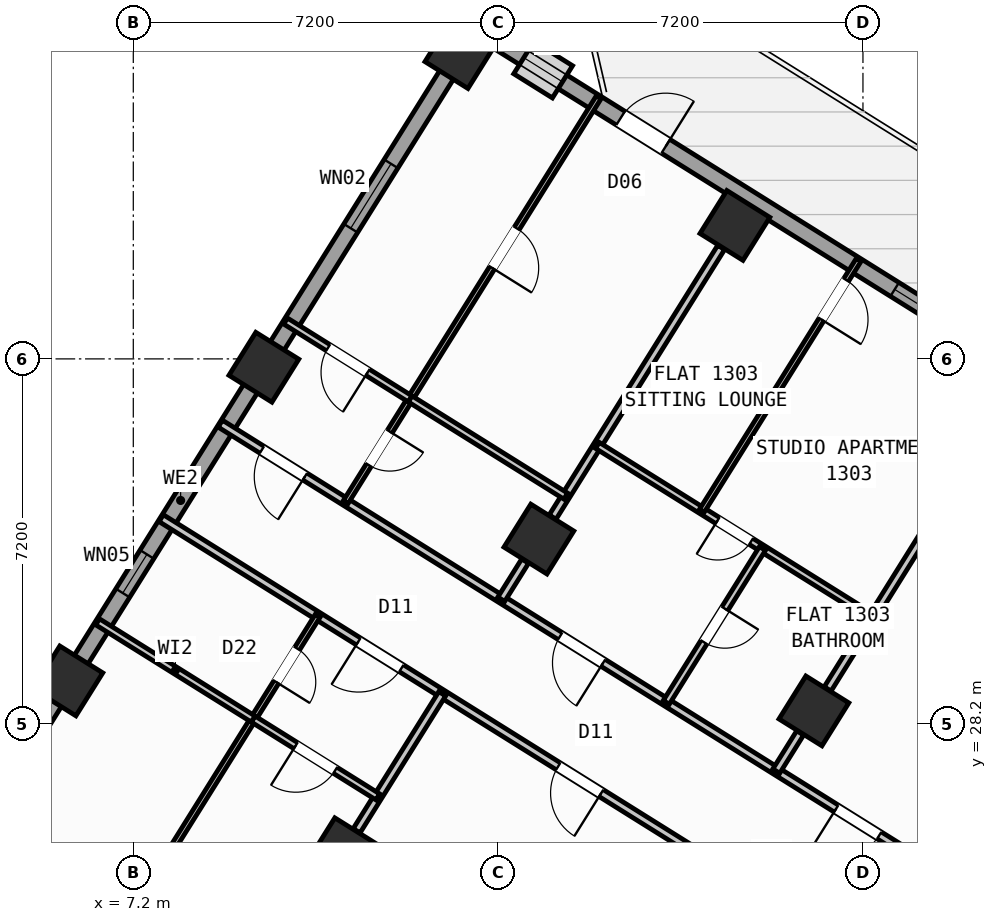
"""IFC4 building model, lengths in metres.
Left out: names, types, materials, properties, quantities, classifications, styles, units other than length and angle.
Written with IfcOpenShell. Run it as: python <this file> out.ifc"""

import sys

from ifc_helpers import new_model, si_unit, direction, frame, frame_2d, origin, origin_2d, place, context, subcontext, project, spatial, rectangle, hollow_rectangle, extrude, source, transform, mapped, element, fill, save


model = new_model("IFC4")
c1 = context("Model", 3, precision=1e-05, world=origin(), true_north=direction((0.0, 1.0)))
c2 = subcontext(c1, "Body", "Model", "MODEL_VIEW")
j1 = project(units=[si_unit("LENGTHUNIT", "METRE"), si_unit("PLANEANGLEUNIT", "RADIAN")], contexts=[c1])
p1 = place(None, origin())
s1 = spatial("IfcSite", under=j1, at=p1, CompositionType="ELEMENT")
p2 = place(p1, origin())
s2 = spatial("IfcBuilding", under=s1, at=p2, CompositionType="ELEMENT")
p3 = place(p2, frame((0.0, 0.0, 52.8)))
s3 = spatial("IfcBuildingStorey", under=s2, at=p3, CompositionType="ELEMENT", Elevation=52.8)
m1 = source(origin(), c2, "Body", "SweptSolid", [
    extrude(hollow_rectangle(XDim=1.0, YDim=1.0, WallThickness=0.04, at=origin_2d()), origin(), (0.0, 0.0, 1.0), 3.6),
])
for number, where, z_axis, x_axis in (
    (1, (20.632, 28.452, 0.0), (0.0, 0.0, 1.0), (-0.848, 0.53, 0.0)),
    (2, (19.073, 38.034, 0.0), (0.0, 0.0, 1.0), (-0.848, 0.53, 0.0)),
    (3, (15.205, 31.844, 0.0), (0.0, 0.0, 1.0), (-0.848, 0.53, 0.0)),
    (4, (11.336, 25.653, 0.0), (0.0, 0.0, 1.0), (-0.848, 0.53, 0.0)),
    (5, (13.646, 41.426, 0.0), (0.0, 0.0, 1.0), (-0.848, 0.53, 0.0)),
    (6, (9.777, 35.235, 0.0), (0.0, 0.0, 1.0), (-0.848, 0.53, 0.0)),
    (7, (5.909, 29.044, 0.0), (0.0, 0.0, 1.0), (-0.848, 0.53, 0.0)),
):
    element("IfcColumn", number, at=place(p3, frame(where, z_axis=z_axis, x_axis=x_axis)), inside=s3, PredefinedType="COLUMN", context=c2, shape_type="MappedRepresentation", body=[
        mapped(m1, transform((0.0, 0.0, 0.0), scale=1.0)),
    ])
p4 = place(p3, frame((2.415, 23.452, 0.0), z_axis=(0.0, 0.0, 1.0), x_axis=(0.52991049553, 0.848053575387, 0.0)))
e8 = element("IfcWall", 8, at=p4, inside=s3, PredefinedType="STANDARD", context=c2, shape_type="SweptSolid", body=[
    extrude(rectangle(XDim=21.587, YDim=0.32, at=frame_2d((10.794, 0.0))), origin(), (0.0, 0.0, 1.0), 2.725),
])
p5 = place(p4, frame((2.356, 0.0, 0.8)))
e9 = element("IfcOpeningElement", 9, at=p5, cuts=e8, PredefinedType="OPENING", context=c2, shape_type="SweptSolid", body=[
    extrude(rectangle(XDim=2.1, YDim=1.55, at=frame_2d((1.05, 0.775))), frame((0.0, 0.17, 0.0), z_axis=(0.0, -1.0, 0.0), x_axis=(1.0, 0.0, 0.0)), (0.0, 0.0, 1.0), 0.34),
])
p6 = place(p4, frame((8.639, 0.0, 1.0)))
e10 = element("IfcOpeningElement", 10, at=p6, cuts=e8, PredefinedType="OPENING", context=c2, shape_type="SweptSolid", body=[
    extrude(rectangle(XDim=0.9, YDim=1.25, at=frame_2d((0.45, 0.625))), frame((0.0, 0.17, 0.0), z_axis=(0.0, -1.0, 0.0), x_axis=(1.0, 0.0, 0.0)), (0.0, 0.0, 1.0), 0.34),
])
p7 = place(p4, frame((17.129, 0.0, 0.85)))
e11 = element("IfcOpeningElement", 11, at=p7, cuts=e8, PredefinedType="OPENING", context=c2, shape_type="SweptSolid", body=[
    extrude(rectangle(XDim=1.5, YDim=1.5, at=frame_2d((0.75, 0.75))), frame((0.0, 0.17, 0.0), z_axis=(0.0, -1.0, 0.0), x_axis=(1.0, 0.0, 0.0)), (0.0, 0.0, 1.0), 0.34),
])
p8 = place(p3, frame((14.138, 41.825, 0.0), z_axis=(0.0, 0.0, 1.0), x_axis=(0.848046498049, -0.529921821731, 0.0)))
e12 = element("IfcWall", 12, at=p8, inside=s3, PredefinedType="STANDARD", context=c2, shape_type="SweptSolid", body=[
    extrude(rectangle(XDim=31.588, YDim=0.32, at=frame_2d((15.794, 0.0))), origin(), (0.0, 0.0, 1.0), 3.35),
])
p9 = place(p8, frame((3.159, 0.0, 0.0)))
e13 = element("IfcOpeningElement", 13, at=p9, cuts=e12, PredefinedType="OPENING", context=c2, shape_type="SweptSolid", body=[
    extrude(rectangle(XDim=1.05, YDim=2.15, at=frame_2d((0.525, 1.075))), frame((0.0, 0.17, 0.0), z_axis=(0.0, -1.0, 0.0), x_axis=(1.0, 0.0, 0.0)), (0.0, 0.0, 1.0), 0.34),
])
p10 = place(p8, frame((0.906, 0.0, 1.0)))
e14 = element("IfcOpeningElement", 14, at=p10, cuts=e12, PredefinedType="OPENING", context=c2, shape_type="SweptSolid", body=[
    extrude(rectangle(XDim=0.9, YDim=1.25, at=frame_2d((0.45, 0.625))), frame((0.0, 0.17, 0.0), z_axis=(0.0, -1.0, 0.0), x_axis=(1.0, 0.0, 0.0)), (0.0, 0.0, 1.0), 0.34),
])
p11 = place(p8, frame((9.537, 0.0, 0.85)))
e15 = element("IfcOpeningElement", 15, at=p11, cuts=e12, PredefinedType="OPENING", context=c2, shape_type="SweptSolid", body=[
    extrude(rectangle(XDim=1.8, YDim=1.5, at=frame_2d((0.9, 0.75))), frame((0.0, 0.17, 0.0), z_axis=(0.0, -1.0, 0.0), x_axis=(1.0, 0.0, 0.0)), (0.0, 0.0, 1.0), 0.34),
])
p12 = place(p8, frame((13.899, 0.0, 0.85)))
e16 = element("IfcOpeningElement", 16, at=p12, cuts=e12, PredefinedType="OPENING", context=c2, shape_type="SweptSolid", body=[
    extrude(rectangle(XDim=1.5, YDim=1.5, at=frame_2d((0.75, 0.75))), frame((0.0, 0.17, 0.0), z_axis=(0.0, -1.0, 0.0), x_axis=(1.0, 0.0, 0.0)), (0.0, 0.0, 1.0), 0.34),
])
p13 = place(p8, frame((22.019, 0.0, 0.95)))
e17 = element("IfcOpeningElement", 17, at=p13, cuts=e12, PredefinedType="OPENING", context=c2, shape_type="SweptSolid", body=[
    extrude(rectangle(XDim=1.2, YDim=1.4, at=frame_2d((0.6, 0.7))), frame((0.0, 0.17, 0.0), z_axis=(0.0, -1.0, 0.0), x_axis=(1.0, 0.0, 0.0)), (0.0, 0.0, 1.0), 0.34),
])
p14 = place(p8, frame((27.569, 0.0, 0.95)))
e18 = element("IfcOpeningElement", 18, at=p14, cuts=e12, PredefinedType="OPENING", context=c2, shape_type="SweptSolid", body=[
    extrude(rectangle(XDim=1.2, YDim=1.4, at=frame_2d((0.6, 0.7))), frame((0.0, 0.17, 0.0), z_axis=(0.0, -1.0, 0.0), x_axis=(1.0, 0.0, 0.0)), (0.0, 0.0, 1.0), 0.34),
])
p15 = place(p3, frame((23.104, 25.256, 0.0), z_axis=(0.0, 0.0, 1.0), x_axis=(-0.848041752158, 0.529929416617, 0.0)))
e19 = element("IfcWall", 19, at=p15, inside=s3, PredefinedType="PARTITIONING", context=c2, shape_type="SweptSolid", body=[
    extrude(rectangle(XDim=16.73, YDim=0.16, at=frame_2d((8.365, 0.0))), origin(), (0.0, 0.0, 1.0), 3.34),
])
p16 = place(p15, frame((1.395, 0.0, 0.0)))
e20 = element("IfcOpeningElement", 20, at=p16, cuts=e19, PredefinedType="OPENING", context=c2, shape_type="SweptSolid", body=[
    extrude(rectangle(XDim=1.0, YDim=2.1, at=frame_2d((0.5, 1.05))), frame((0.0, 0.09, 0.0), z_axis=(0.0, -1.0, 0.0), x_axis=(1.0, 0.0, 0.0)), (0.0, 0.0, 1.0), 0.18),
])
p17 = place(p15, frame((7.82, 0.0, 0.0)))
e21 = element("IfcOpeningElement", 21, at=p17, cuts=e19, PredefinedType="OPENING", context=c2, shape_type="SweptSolid", body=[
    extrude(rectangle(XDim=1.0, YDim=2.1, at=frame_2d((0.5, 1.05))), frame((0.0, 0.09, 0.0), z_axis=(0.0, -1.0, 0.0), x_axis=(1.0, 0.0, 0.0)), (0.0, 0.0, 1.0), 0.18),
])
p18 = place(p15, frame((14.76, 0.0, 0.0)))
e22 = element("IfcOpeningElement", 22, at=p18, cuts=e19, PredefinedType="OPENING", context=c2, shape_type="SweptSolid", body=[
    extrude(rectangle(XDim=1.0, YDim=2.1, at=frame_2d((0.5, 1.05))), frame((0.0, 0.09, 0.0), z_axis=(0.0, -1.0, 0.0), x_axis=(1.0, 0.0, 0.0)), (0.0, 0.0, 1.0), 0.18),
])
p19 = place(p3, frame((21.938, 23.391, 0.0), z_axis=(0.0, 0.0, 1.0), x_axis=(-0.848045850158, 0.529922858565, 0.0)))
e23 = element("IfcWall", 23, at=p19, inside=s3, PredefinedType="PARTITIONING", context=c2, shape_type="SweptSolid", body=[
    extrude(rectangle(XDim=16.73, YDim=0.16, at=frame_2d((8.365, 0.0))), origin(), (0.0, 0.0, 1.0), 3.34),
])
p20 = place(p19, frame((2.22, 0.0, 0.0)))
e24 = element("IfcOpeningElement", 24, at=p20, cuts=e23, PredefinedType="OPENING", context=c2, shape_type="SweptSolid", body=[
    extrude(rectangle(XDim=0.86, YDim=2.05, at=frame_2d((0.43, 1.025))), frame((0.0, 0.09, 0.0), z_axis=(0.0, -1.0, 0.0), x_axis=(1.0, 0.0, 0.0)), (0.0, 0.0, 1.0), 0.18),
])
p21 = place(p19, frame((6.49, 0.0, 0.0)))
e25 = element("IfcOpeningElement", 25, at=p21, cuts=e23, PredefinedType="OPENING", context=c2, shape_type="SweptSolid", body=[
    extrude(rectangle(XDim=1.0, YDim=2.1, at=frame_2d((0.5, 1.05))), frame((0.0, 0.09, 0.0), z_axis=(0.0, -1.0, 0.0), x_axis=(1.0, 0.0, 0.0)), (0.0, 0.0, 1.0), 0.18),
])
p22 = place(p19, frame((11.14, 0.0, 0.0)))
e26 = element("IfcOpeningElement", 26, at=p22, cuts=e23, PredefinedType="OPENING", context=c2, shape_type="SweptSolid", body=[
    extrude(rectangle(XDim=1.0, YDim=2.1, at=frame_2d((0.5, 1.05))), frame((0.0, 0.09, 0.0), z_axis=(0.0, -1.0, 0.0), x_axis=(1.0, 0.0, 0.0)), (0.0, 0.0, 1.0), 0.18),
])
p23 = place(p3, frame((13.297, 28.791, 0.0), z_axis=(0.0, 0.0, 1.0), x_axis=(-0.529930102756, -0.848041323399, 0.0)))
e27 = element("IfcWall", 27, at=p23, inside=s3, PredefinedType="PARTITIONING", context=c2, shape_type="SweptSolid", body=[
    extrude(rectangle(XDim=3.188, YDim=0.16, at=frame_2d((1.594, 0.0))), origin(), (0.0, 0.0, 1.0), 2.725),
])
p24 = place(p3, frame((10.837, 30.327, 0.0), z_axis=(0.0, 0.0, 1.0), x_axis=(-0.529912148489, -0.848052542525, 0.0)))
e28 = element("IfcWall", 28, at=p24, inside=s3, PredefinedType="PARTITIONING", context=c2, shape_type="SweptSolid", body=[
    extrude(rectangle(XDim=10.62, YDim=0.11, at=frame_2d((5.31, 0.0))), origin(), (0.0, 0.0, 1.0), 3.34),
])
p25 = place(p24, frame((0.76, 0.0, 0.0)))
e29 = element("IfcOpeningElement", 29, at=p25, cuts=e28, PredefinedType="OPENING", context=c2, shape_type="SweptSolid", body=[
    extrude(rectangle(XDim=0.78, YDim=2.05, at=frame_2d((0.39, 1.025))), frame((0.0, 0.065, 0.0), z_axis=(0.0, -1.0, 0.0), x_axis=(1.0, 0.0, 0.0)), (0.0, 0.0, 1.0), 0.13),
])
p26 = place(p24, frame((6.05, 0.0, 0.0)))
e30 = element("IfcOpeningElement", 30, at=p26, cuts=e28, PredefinedType="OPENING", context=c2, shape_type="SweptSolid", body=[
    extrude(rectangle(XDim=0.92, YDim=2.08, at=frame_2d((0.46, 1.04))), frame((0.0, 0.065, 0.0), z_axis=(0.0, -1.0, 0.0), x_axis=(1.0, 0.0, 0.0)), (0.0, 0.0, 1.0), 0.13),
])
p27 = place(p3, frame((12.025, 26.755, 0.0), z_axis=(0.0, 0.0, 1.0), x_axis=(-0.848059786386, 0.529900555496, 0.0)))
e31 = element("IfcWall", 31, at=p27, inside=s3, PredefinedType="PLUMBINGWALL", context=c2, shape_type="SweptSolid", body=[
    extrude(rectangle(XDim=2.9, YDim=0.14, at=frame_2d((1.45, 0.0))), origin(), (0.0, 0.0, 1.0), 3.34),
])
p28 = place(p27, frame((0.99, 0.0, 0.0)))
e32 = element("IfcOpeningElement", 32, at=p28, cuts=e31, PredefinedType="OPENING", context=c2, shape_type="SweptSolid", body=[
    extrude(rectangle(XDim=0.92, YDim=2.08, at=frame_2d((0.46, 1.04))), frame((0.0, 0.08, 0.0), z_axis=(0.0, -1.0, 0.0), x_axis=(1.0, 0.0, 0.0)), (0.0, 0.0, 1.0), 0.16),
])
p29 = place(p3, frame((9.566, 28.292, 0.0), z_axis=(0.0, 0.0, 1.0), x_axis=(-0.848021036626, 0.529962566074, 0.0)))
e33 = element("IfcWall", 33, at=p29, inside=s3, PredefinedType="PLUMBINGWALL", context=c2, shape_type="SweptSolid", body=[
    extrude(rectangle(XDim=3.62, YDim=0.14, at=frame_2d((1.81, 0.0))), origin(), (0.0, 0.0, 1.0), 3.34),
])
p30 = place(p3, frame((24.229, 34.209, 0.0), z_axis=(0.0, 0.0, 1.0), x_axis=(-0.529897533635, -0.848061674554, 0.0)))
e34 = element("IfcWall", 34, at=p30, inside=s3, PredefinedType="PARTITIONING", context=c2, shape_type="SweptSolid", body=[
    extrude(rectangle(XDim=6.276, YDim=0.16, at=frame_2d((3.138, 0.0))), origin(), (0.0, 0.0, 1.0), 2.725),
])
p31 = place(p3, frame((20.361, 28.018, 0.0), z_axis=(0.0, 0.0, 1.0), x_axis=(-0.529900064649, -0.848060093086, 0.0)))
e35 = element("IfcWall", 35, at=p31, inside=s3, PredefinedType="PARTITIONING", context=c2, shape_type="SweptSolid", body=[
    extrude(rectangle(XDim=0.888, YDim=0.16, at=frame_2d((0.444, 0.0))), origin(), (0.0, 0.0, 1.0), 2.725),
])
p32 = place(p3, frame((18.802, 37.6, 0.0), z_axis=(0.0, 0.0, 1.0), x_axis=(-0.529915015264, -0.848050751193, 0.0)))
e36 = element("IfcWall", 36, at=p32, inside=s3, PredefinedType="PARTITIONING", context=c2, shape_type="SweptSolid", body=[
    extrude(rectangle(XDim=6.276, YDim=0.16, at=frame_2d((3.138, 0.0))), origin(), (0.0, 0.0, 1.0), 2.725),
])
p33 = place(p3, frame((14.933, 31.409, 0.0), z_axis=(0.0, 0.0, 1.0), x_axis=(-0.529776512202, -0.848137280821, 0.0)))
e37 = element("IfcWall", 37, at=p33, inside=s3, PredefinedType="PARTITIONING", context=c2, shape_type="SweptSolid", body=[
    extrude(rectangle(XDim=0.888, YDim=0.16, at=frame_2d((0.444, 0.0))), origin(), (0.0, 0.0, 1.0), 2.725),
])
p34 = place(p3, frame((21.787, 30.301, 0.0), z_axis=(0.0, 0.0, 1.0), x_axis=(-0.848049732085, 0.529916646191, 0.0)))
e38 = element("IfcWall", 38, at=p34, inside=s3, PredefinedType="PLUMBINGWALL", context=c2, shape_type="SweptSolid", body=[
    extrude(rectangle(XDim=6.4, YDim=0.14, at=frame_2d((3.2, 0.0))), origin(), (0.0, 0.0, 1.0), 3.34),
])
p35 = place(p34, frame((2.824, 0.0, 0.0)))
e39 = element("IfcOpeningElement", 39, at=p35, cuts=e38, PredefinedType="OPENING", context=c2, shape_type="SweptSolid", body=[
    extrude(rectangle(XDim=0.78, YDim=2.05, at=frame_2d((0.39, 1.025))), frame((0.0, 0.08, 0.0), z_axis=(0.0, -1.0, 0.0), x_axis=(1.0, 0.0, 0.0)), (0.0, 0.0, 1.0), 0.16),
])
p36 = place(p3, frame((19.616, 31.657, 0.0), z_axis=(0.0, 0.0, 1.0), x_axis=(-0.529876336437, -0.84807491891, 0.0)))
e40 = element("IfcWall", 40, at=p36, inside=s3, PredefinedType="PLUMBINGWALL", context=c2, shape_type="SweptSolid", body=[
    extrude(rectangle(XDim=3.58, YDim=0.14, at=frame_2d((1.79, 0.0))), origin(), (0.0, 0.0, 1.0), 3.34),
])
p37 = place(p36, frame((1.4, 0.0, 0.0)))
e41 = element("IfcOpeningElement", 41, at=p37, cuts=e40, PredefinedType="OPENING", context=c2, shape_type="SweptSolid", body=[
    extrude(rectangle(XDim=0.78, YDim=2.05, at=frame_2d((0.39, 1.025))), frame((0.0, 0.08, 0.0), z_axis=(0.0, -1.0, 0.0), x_axis=(1.0, 0.0, 0.0)), (0.0, 0.0, 1.0), 0.16),
])
p38 = place(p3, frame((21.517, 37.356, 0.0), z_axis=(0.0, 0.0, 1.0), x_axis=(-0.529916267533, -0.848049968695, 0.0)))
e42 = element("IfcWall", 42, at=p38, inside=s3, PredefinedType="PARTITIONING", context=c2, shape_type="SweptSolid", body=[
    extrude(rectangle(XDim=5.84, YDim=0.11, at=frame_2d((2.92, 0.0))), origin(), (0.0, 0.0, 1.0), 3.34),
])
p39 = place(p38, frame((0.47, 0.0, 0.0)))
e43 = element("IfcOpeningElement", 43, at=p39, cuts=e42, PredefinedType="OPENING", context=c2, shape_type="SweptSolid", body=[
    extrude(rectangle(XDim=0.92, YDim=2.08, at=frame_2d((0.46, 1.04))), frame((0.0, 0.065, 0.0), z_axis=(0.0, -1.0, 0.0), x_axis=(1.0, 0.0, 0.0)), (0.0, 0.0, 1.0), 0.13),
])
p40 = place(p3, frame((16.385, 40.563, 0.0), z_axis=(0.0, 0.0, 1.0), x_axis=(-0.529931378574, -0.848040526156, 0.0)))
e44 = element("IfcWall", 44, at=p40, inside=s3, PredefinedType="PARTITIONING", context=c2, shape_type="SweptSolid", body=[
    extrude(rectangle(XDim=9.42, YDim=0.11, at=frame_2d((4.71, 0.0))), origin(), (0.0, 0.0, 1.0), 3.34),
])
p41 = place(p40, frame((7.78, 0.0, 0.0)))
e45 = element("IfcOpeningElement", 45, at=p41, cuts=e44, PredefinedType="OPENING", context=c2, shape_type="SweptSolid", body=[
    extrude(rectangle(XDim=0.78, YDim=2.05, at=frame_2d((0.39, 1.025))), frame((0.0, 0.065, 0.0), z_axis=(0.0, -1.0, 0.0), x_axis=(1.0, 0.0, 0.0)), (0.0, 0.0, 1.0), 0.13),
])
p42 = place(p40, frame((3.05, 0.0, 0.0)))
e46 = element("IfcOpeningElement", 46, at=p42, cuts=e44, PredefinedType="OPENING", context=c2, shape_type="SweptSolid", body=[
    extrude(rectangle(XDim=0.92, YDim=2.08, at=frame_2d((0.46, 1.04))), frame((0.0, 0.065, 0.0), z_axis=(0.0, -1.0, 0.0), x_axis=(1.0, 0.0, 0.0)), (0.0, 0.0, 1.0), 0.13),
])
p43 = place(p3, frame((12.665, 34.61, 0.0), z_axis=(0.0, 0.0, 1.0), x_axis=(-0.848045593671, 0.529923269025, 0.0)))
e47 = element("IfcWall", 47, at=p43, inside=s3, PredefinedType="PLUMBINGWALL", context=c2, shape_type="SweptSolid", body=[
    extrude(rectangle(XDim=2.9, YDim=0.14, at=frame_2d((1.45, 0.0))), origin(), (0.0, 0.0, 1.0), 3.34),
])
p44 = place(p43, frame((0.99, 0.0, 0.0)))
e48 = element("IfcOpeningElement", 48, at=p44, cuts=e47, PredefinedType="OPENING", context=c2, shape_type="SweptSolid", body=[
    extrude(rectangle(XDim=0.92, YDim=2.08, at=frame_2d((0.46, 1.04))), frame((0.0, 0.08, 0.0), z_axis=(0.0, -1.0, 0.0), x_axis=(1.0, 0.0, 0.0)), (0.0, 0.0, 1.0), 0.16),
])
p45 = place(p3, frame((15.734, 32.692, 0.0), z_axis=(0.0, 0.0, 1.0), x_axis=(-0.848051346257, 0.52991406295, 0.0)))
e49 = element("IfcWall", 49, at=p45, inside=s3, PredefinedType="PLUMBINGWALL", context=c2, shape_type="SweptSolid", body=[
    extrude(rectangle(XDim=3.62, YDim=0.14, at=frame_2d((1.81, 0.0))), origin(), (0.0, 0.0, 1.0), 3.34),
])
m2 = source(origin(), c2, "Body", "SweptSolid", [
    extrude(rectangle(XDim=1.05, YDim=2.15, at=frame_2d((0.525, 1.075))), frame((0.0, 0.025, 0.0), z_axis=(0.0, -1.0, 0.0), x_axis=(1.0, 0.0, 0.0)), (0.0, 0.0, 1.0), 0.05),
])
p46 = place(p9, origin())
e50 = element("IfcDoor", 50, at=p46, inside=s3, OperationType="SINGLE_SWING_RIGHT", PredefinedType="DOOR", context=c2, shape_type="MappedRepresentation", body=[
    mapped(m2, transform((0.0, 0.0, 0.0), scale=1.0)),
])
fill(e13, e50)
m3 = source(origin(), c2, "Body", "SweptSolid", [
    extrude(rectangle(XDim=0.9, YDim=1.25, at=frame_2d((0.45, 0.625))), frame((0.0, 0.03, 0.0), z_axis=(0.0, -1.0, 0.0), x_axis=(1.0, 0.0, 0.0)), (0.0, 0.0, 1.0), 0.06),
])
p47 = place(p6, origin())
e51 = element("IfcWindow", 51, at=p47, inside=s3, PartitioningType="SINGLE_PANEL", PredefinedType="WINDOW", context=c2, shape_type="MappedRepresentation", body=[
    mapped(m3, transform((0.0, 0.0, 0.0), scale=1.0)),
])
fill(e10, e51)
m4 = source(origin(), c2, "Body", "SweptSolid", [
    extrude(rectangle(XDim=1.5, YDim=1.5, at=frame_2d((0.75, 0.75))), frame((0.0, 0.03, 0.0), z_axis=(0.0, -1.0, 0.0), x_axis=(1.0, 0.0, 0.0)), (0.0, 0.0, 1.0), 0.06),
])
p48 = place(p7, origin())
e52 = element("IfcWindow", 52, at=p48, inside=s3, PartitioningType="SINGLE_PANEL", PredefinedType="WINDOW", context=c2, shape_type="MappedRepresentation", body=[
    mapped(m4, transform((0.0, 0.0, 0.0), scale=1.0)),
])
fill(e11, e52)
p49 = place(p10, origin())
e53 = element("IfcWindow", 53, at=p49, inside=s3, PartitioningType="SINGLE_PANEL", PredefinedType="WINDOW", context=c2, shape_type="MappedRepresentation", body=[
    mapped(m3, transform((0.0, 0.0, 0.0), scale=1.0)),
])
fill(e14, e53)
m5 = source(origin(), c2, "Body", "SweptSolid", [
    extrude(rectangle(XDim=1.8, YDim=1.5, at=frame_2d((0.9, 0.75))), frame((0.0, 0.03, 0.0), z_axis=(0.0, -1.0, 0.0), x_axis=(1.0, 0.0, 0.0)), (0.0, 0.0, 1.0), 0.06),
])
p50 = place(p11, origin())
e54 = element("IfcWindow", 54, at=p50, inside=s3, PartitioningType="SINGLE_PANEL", PredefinedType="WINDOW", context=c2, shape_type="MappedRepresentation", body=[
    mapped(m5, transform((0.0, 0.0, 0.0), scale=1.0)),
])
fill(e15, e54)
m6 = source(origin(), c2, "Body", "SweptSolid", [
    extrude(rectangle(XDim=1.0, YDim=2.1, at=frame_2d((0.5, 1.05))), frame((0.0, 0.025, 0.0), z_axis=(0.0, -1.0, 0.0), x_axis=(1.0, 0.0, 0.0)), (0.0, 0.0, 1.0), 0.05),
])
p51 = place(p21, origin())
e55 = element("IfcDoor", 55, at=p51, inside=s3, OperationType="SINGLE_SWING_LEFT", PredefinedType="DOOR", context=c2, shape_type="MappedRepresentation", body=[
    mapped(m6, transform((0.0, 0.0, 0.0), scale=1.0)),
])
fill(e25, e55)
p52 = place(p22, origin())
e56 = element("IfcDoor", 56, at=p52, inside=s3, OperationType="SINGLE_SWING_RIGHT", PredefinedType="DOOR", context=c2, shape_type="MappedRepresentation", body=[
    mapped(m6, transform((0.0, 0.0, 0.0), scale=1.0)),
])
fill(e26, e56)
m7 = source(origin(), c2, "Body", "SweptSolid", [
    extrude(rectangle(XDim=0.92, YDim=2.08, at=frame_2d((0.46, 1.04))), frame((0.0, 0.025, 0.0), z_axis=(0.0, -1.0, 0.0), x_axis=(1.0, 0.0, 0.0)), (0.0, 0.0, 1.0), 0.05),
])
p53 = place(p28, origin())
e57 = element("IfcDoor", 57, at=p53, inside=s3, OperationType="SINGLE_SWING_RIGHT", PredefinedType="DOOR", context=c2, shape_type="MappedRepresentation", body=[
    mapped(m7, transform((0.0, 0.0, 0.0), scale=1.0)),
])
fill(e32, e57)
m8 = source(origin(), c2, "Body", "SweptSolid", [
    extrude(rectangle(XDim=0.78, YDim=2.05, at=frame_2d((0.39, 1.025))), frame((0.0, 0.025, 0.0), z_axis=(0.0, -1.0, 0.0), x_axis=(1.0, 0.0, 0.0)), (0.0, 0.0, 1.0), 0.05),
])
p54 = place(p25, origin())
e58 = element("IfcDoor", 58, at=p54, inside=s3, OperationType="SINGLE_SWING_RIGHT", PredefinedType="DOOR", context=c2, shape_type="MappedRepresentation", body=[
    mapped(m8, transform((0.0, 0.0, 0.0), scale=1.0)),
])
fill(e29, e58)
p55 = place(p16, origin())
e59 = element("IfcDoor", 59, at=p55, inside=s3, OperationType="SINGLE_SWING_RIGHT", PredefinedType="DOOR", context=c2, shape_type="MappedRepresentation", body=[
    mapped(m6, transform((0.0, 0.0, 0.0), scale=1.0)),
])
fill(e20, e59)
p56 = place(p39, origin())
e60 = element("IfcDoor", 60, at=p56, inside=s3, OperationType="SINGLE_SWING_RIGHT", PredefinedType="DOOR", context=c2, shape_type="MappedRepresentation", body=[
    mapped(m7, transform((0.0, 0.0, 0.0), scale=1.0)),
])
fill(e43, e60)
p57 = place(p17, origin())
e61 = element("IfcDoor", 61, at=p57, inside=s3, OperationType="SINGLE_SWING_LEFT", PredefinedType="DOOR", context=c2, shape_type="MappedRepresentation", body=[
    mapped(m6, transform((0.0, 0.0, 0.0), scale=1.0)),
])
fill(e21, e61)
p58 = place(p35, origin())
e62 = element("IfcDoor", 62, at=p58, inside=s3, OperationType="SINGLE_SWING_RIGHT", PredefinedType="DOOR", context=c2, shape_type="MappedRepresentation", body=[
    mapped(m8, transform((0.0, 0.0, 0.0), scale=1.0)),
])
fill(e39, e62)
p59 = place(p37, origin())
e63 = element("IfcDoor", 63, at=p59, inside=s3, OperationType="SINGLE_SWING_LEFT", PredefinedType="DOOR", context=c2, shape_type="MappedRepresentation", body=[
    mapped(m8, transform((0.0, 0.0, 0.0), scale=1.0)),
])
fill(e41, e63)
p60 = place(p18, origin())
e64 = element("IfcDoor", 64, at=p60, inside=s3, OperationType="SINGLE_SWING_LEFT", PredefinedType="DOOR", context=c2, shape_type="MappedRepresentation", body=[
    mapped(m6, transform((0.0, 0.0, 0.0), scale=1.0)),
])
fill(e22, e64)
p61 = place(p44, origin())
e65 = element("IfcDoor", 65, at=p61, inside=s3, OperationType="SINGLE_SWING_LEFT", PredefinedType="DOOR", context=c2, shape_type="MappedRepresentation", body=[
    mapped(m7, transform((0.0, 0.0, 0.0), scale=1.0)),
])
fill(e48, e65)
p62 = place(p41, origin())
e66 = element("IfcDoor", 66, at=p62, inside=s3, OperationType="SINGLE_SWING_LEFT", PredefinedType="DOOR", context=c2, shape_type="MappedRepresentation", body=[
    mapped(m8, transform((0.0, 0.0, 0.0), scale=1.0)),
])
fill(e45, e66)
p63 = place(p42, origin())
e67 = element("IfcDoor", 67, at=p63, inside=s3, OperationType="SINGLE_SWING_RIGHT", PredefinedType="DOOR", context=c2, shape_type="MappedRepresentation", body=[
    mapped(m7, transform((0.0, 0.0, 0.0), scale=1.0)),
])
fill(e46, e67)
save(model, sys.argv[1])
